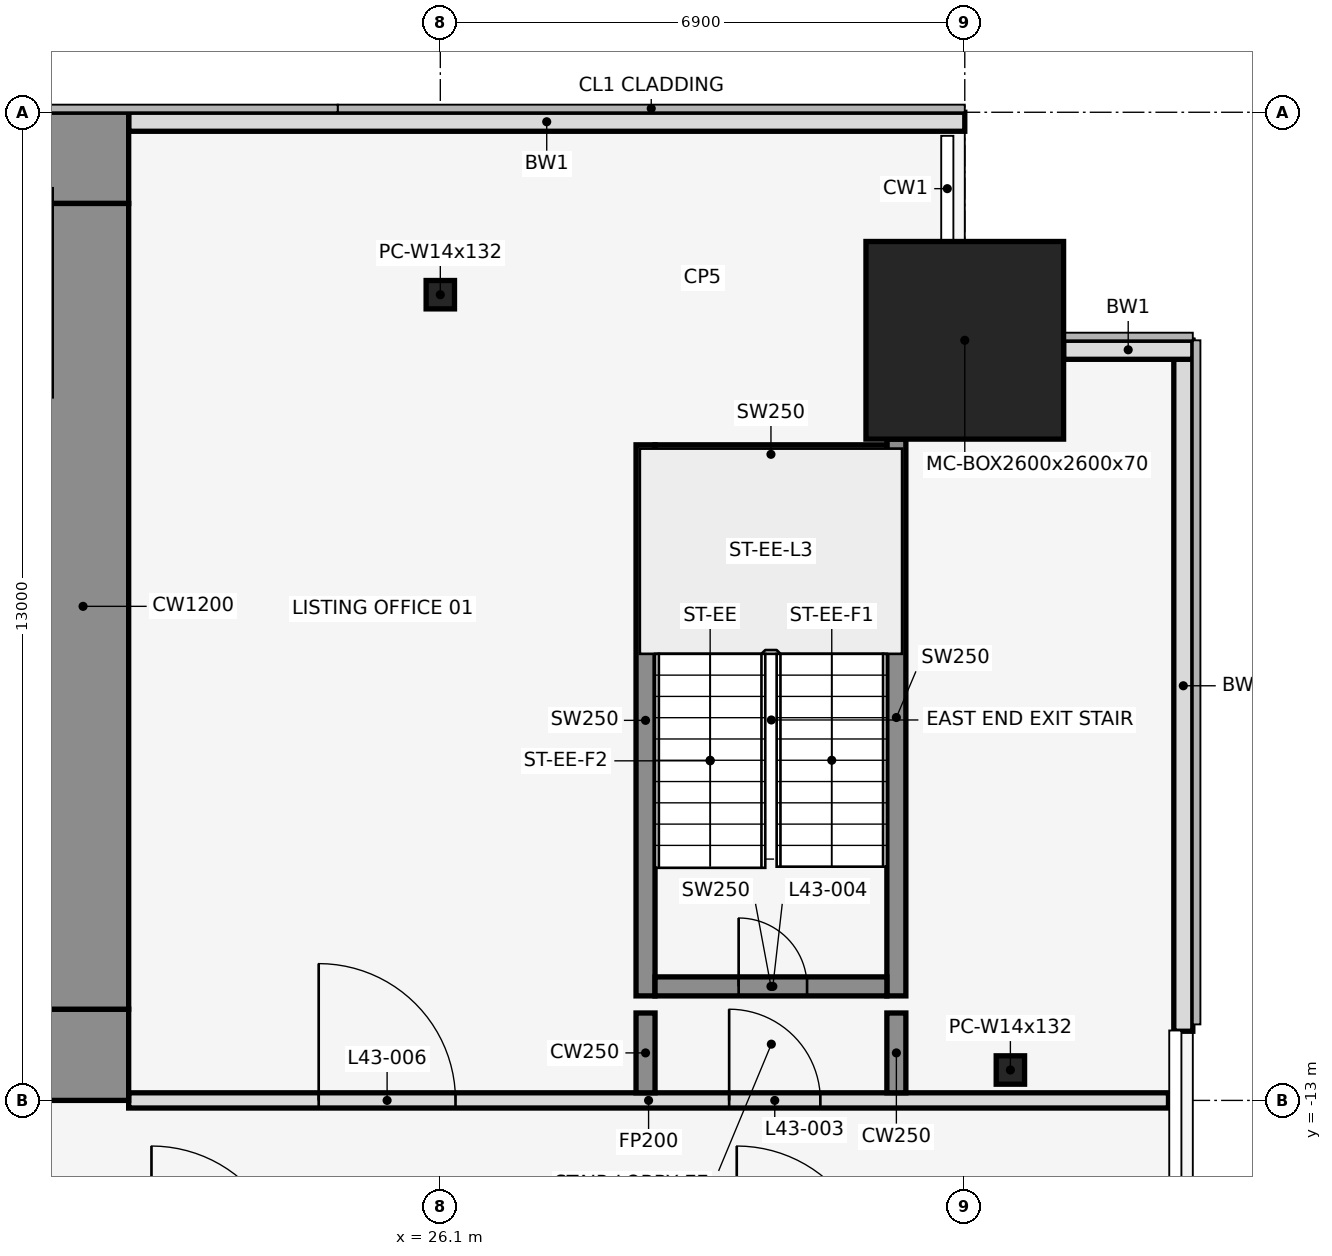
"""IFC4 building model, lengths in metres.
Left out: names, types, materials, properties, quantities, classifications, styles, units other than length and angle.
Written with IfcOpenShell. Run it as: python <this file> out.ifc"""

import sys

from ifc_helpers import new_model, si_unit, direction, frame, frame_2d, origin, origin_2d, place, context, subcontext, project, spatial, rectangle, hollow_rectangle, i_section, extrude, element, fill, save


model = new_model("IFC4")
c1 = context("Model", 3, precision=1e-05, world=origin(), true_north=direction((0.0, 1.0)))
c2 = subcontext(c1, "Body", "Model", "MODEL_VIEW")
j1 = project(units=[si_unit("LENGTHUNIT", "METRE"), si_unit("PLANEANGLEUNIT", "RADIAN")], contexts=[c1])
p1 = place(None, origin())
s1 = spatial("IfcSite", under=j1, at=p1, CompositionType="ELEMENT")
p2 = place(p1, origin())
s2 = spatial("IfcBuilding", under=s1, at=p2, CompositionType="ELEMENT")
p3 = place(p2, frame((0.0, 0.0, 195.0)))
s3 = spatial("IfcBuildingStorey", under=s2, at=p3, CompositionType="ELEMENT", Elevation=195.0)
p4 = place(p3, frame((26.1, -2.4, 0.0), z_axis=(0.0, 0.0, 1.0), x_axis=(1.0, 0.0, 0.0)))
e1 = element("IfcColumn", 1, at=p4, inside=s3, PredefinedType="COLUMN", context=c2, shape_type="SweptSolid", body=[
    extrude(i_section(OverallWidth=0.373, OverallDepth=0.373, WebThickness=0.016, FlangeThickness=0.026, at=origin_2d()), origin(), (0.0, 0.0, 1.0), 4.1),
])
p5 = place(p3, frame((33.0, -3.0, 0.0), z_axis=(0.0, 0.0, 1.0), x_axis=(1.0, 0.0, 0.0)))
e2 = element("IfcColumn", 2, at=p5, inside=s3, PredefinedType="COLUMN", context=c2, shape_type="SweptSolid", body=[
    extrude(hollow_rectangle(XDim=2.6, YDim=2.6, WallThickness=0.07, at=origin_2d()), origin(), (0.0, 0.0, 1.0), 4.1),
])
p6 = place(p3, frame((33.6, -12.6, 0.0), z_axis=(0.0, 0.0, 1.0), x_axis=(1.0, 0.0, 0.0)))
e3 = element("IfcColumn", 3, at=p6, inside=s3, PredefinedType="COLUMN", context=c2, shape_type="SweptSolid", body=[
    extrude(i_section(OverallWidth=0.373, OverallDepth=0.373, WebThickness=0.016, FlangeThickness=0.026, at=origin_2d()), origin(), (0.0, 0.0, 1.0), 4.1),
])
p7 = place(p3, frame((33.0, -0.125, 0.0), z_axis=(0.0, 0.0, 1.0), x_axis=(-1.0, 0.0, 0.0)))
e4 = element("IfcWall", 4, at=p7, inside=s3, PredefinedType="STANDARD", context=c2, shape_type="SweptSolid", body=[
    extrude(rectangle(XDim=11.0, YDim=0.25, at=frame_2d((5.5, 0.0))), origin(), (0.0, 0.0, 1.0), 3.95),
])
p8 = place(p3, frame((35.875, -12.09, 0.0), z_axis=(0.0, 0.0, 1.0), x_axis=(0.0, 1.0, 0.0)))
e5 = element("IfcWall", 5, at=p8, inside=s3, PredefinedType="STANDARD", context=c2, shape_type="SweptSolid", body=[
    extrude(rectangle(XDim=9.09, YDim=0.25, at=frame_2d((4.545, 0.0))), origin(), (0.0, 0.0, 1.0), 3.95),
])
p9 = place(p3, frame((36.0, -3.125, 0.0), z_axis=(0.0, 0.0, 1.0), x_axis=(-1.0, 0.0, 0.0)))
e6 = element("IfcWall", 6, at=p9, inside=s3, PredefinedType="STANDARD", context=c2, shape_type="SweptSolid", body=[
    extrude(rectangle(XDim=1.7, YDim=0.25, at=frame_2d((0.85, 0.0))), origin(), (0.0, 0.0, 1.0), 3.95),
])
p10 = place(p3, frame((28.8, -11.625, 0.0), z_axis=(0.0, 0.0, 1.0), x_axis=(0.0, 1.0, 0.0)))
e7 = element("IfcWall", 7, at=p10, inside=s3, PredefinedType="SHEAR", context=c2, shape_type="SweptSolid", body=[
    extrude(rectangle(XDim=7.25, YDim=0.25, at=frame_2d((3.625, 0.0))), origin(), (0.0, 0.0, 1.0), 4.1),
])
p11 = place(p3, frame((32.1, -11.625, 0.0), z_axis=(0.0, 0.0, 1.0), x_axis=(0.0, 1.0, 0.0)))
e8 = element("IfcWall", 8, at=p11, inside=s3, PredefinedType="SHEAR", context=c2, shape_type="SweptSolid", body=[
    extrude(rectangle(XDim=7.325, YDim=0.25, at=frame_2d((3.663, 0.0))), origin(), (0.0, 0.0, 1.0), 4.1),
])
p12 = place(p3, frame((28.925, -11.5, 0.0), z_axis=(0.0, 0.0, 1.0), x_axis=(1.0, 0.0, 0.0)))
e9 = element("IfcWall", 9, at=p12, inside=s3, PredefinedType="SHEAR", context=c2, shape_type="SweptSolid", body=[
    extrude(rectangle(XDim=3.05, YDim=0.25, at=frame_2d((1.525, 0.0))), origin(), (0.0, 0.0, 1.0), 4.1),
])
p13 = place(p12, frame((1.1, 0.0, 0.0)))
e10 = element("IfcOpeningElement", 10, at=p13, cuts=e9, PredefinedType="OPENING", context=c2, shape_type="SweptSolid", body=[
    extrude(rectangle(XDim=0.9, YDim=2.1, at=frame_2d((0.45, 1.05))), frame((0.0, 0.137, 0.0), z_axis=(0.0, -1.0, 0.0), x_axis=(1.0, 0.0, 0.0)), (0.0, 0.0, 1.0), 0.274),
])
p14 = place(p3, frame((28.925, -4.5, 0.0), z_axis=(0.0, 0.0, 1.0), x_axis=(1.0, 0.0, 0.0)))
e11 = element("IfcWall", 11, at=p14, inside=s3, PredefinedType="SHEAR", context=c2, shape_type="SweptSolid", body=[
    extrude(rectangle(XDim=3.05, YDim=0.25, at=frame_2d((1.525, 0.0))), origin(), (0.0, 0.0, 1.0), 4.1),
])
p15 = place(p3, frame((22.0, -13.0, 0.0), z_axis=(0.0, 0.0, 1.0), x_axis=(1.0, 0.0, 0.0)))
e12 = element("IfcWall", 12, at=p15, inside=s3, PredefinedType="PARTITIONING", context=c2, shape_type="SweptSolid", body=[
    extrude(rectangle(XDim=13.68, YDim=0.2, at=frame_2d((6.84, 0.0))), origin(), (0.0, 0.0, 1.0), 2.84),
])
p16 = place(p15, frame((7.9, 0.0, 0.0)))
e13 = element("IfcOpeningElement", 13, at=p16, cuts=e12, PredefinedType="OPENING", context=c2, shape_type="SweptSolid", body=[
    extrude(rectangle(XDim=1.2, YDim=2.1, at=frame_2d((0.6, 1.05))), frame((0.0, 0.112, 0.0), z_axis=(0.0, -1.0, 0.0), x_axis=(1.0, 0.0, 0.0)), (0.0, 0.0, 1.0), 0.224),
])
p17 = place(p15, frame((2.5, 0.0, 0.0)))
e14 = element("IfcOpeningElement", 14, at=p17, cuts=e12, PredefinedType="OPENING", context=c2, shape_type="SweptSolid", body=[
    extrude(rectangle(XDim=1.8, YDim=2.1, at=frame_2d((0.9, 1.05))), frame((0.0, 0.112, 0.0), z_axis=(0.0, -1.0, 0.0), x_axis=(1.0, 0.0, 0.0)), (0.0, 0.0, 1.0), 0.224),
])
for number, where, z_axis, x_axis in (
    (15, (28.8, -12.9, 0.0), (0.0, 0.0, 1.0), (0.0, 1.0, 0.0)),
    (16, (32.1, -12.9, 0.0), (0.0, 0.0, 1.0), (0.0, 1.0, 0.0)),
):
    element("IfcWall", number, at=place(p3, frame(where, z_axis=z_axis, x_axis=x_axis)), inside=s3, PredefinedType="SHEAR", context=c2, shape_type="SweptSolid", body=[
        extrude(rectangle(XDim=1.05, YDim=0.25, at=frame_2d((0.525, 0.0))), origin(), (0.0, 0.0, 1.0), 4.1),
    ])
p18 = place(p3, frame((-22.0, -0.6, 0.0), z_axis=(0.0, 0.0, 1.0), x_axis=(1.0, 0.0, 0.0)))
e17 = element("IfcWall", 17, at=p18, inside=s3, PredefinedType="SHEAR", context=c2, shape_type="SweptSolid", body=[
    extrude(rectangle(XDim=44.0, YDim=1.2, at=frame_2d((22.0, 0.0))), origin(), (0.0, 0.0, 1.0), 4.1),
])
p19 = place(p18, frame((18.55, 0.0, 0.0)))
e18 = element("IfcOpeningElement", 18, at=p19, cuts=e17, PredefinedType="OPENING", context=c2, shape_type="SweptSolid", body=[
    extrude(rectangle(XDim=0.9, YDim=2.1, at=frame_2d((0.45, 1.05))), frame((0.0, 0.612, 0.0), z_axis=(0.0, -1.0, 0.0), x_axis=(1.0, 0.0, 0.0)), (0.0, 0.0, 1.0), 1.224),
])
p20 = place(p18, frame((24.55, 0.0, 0.0)))
e19 = element("IfcOpeningElement", 19, at=p20, cuts=e17, PredefinedType="OPENING", context=c2, shape_type="SweptSolid", body=[
    extrude(rectangle(XDim=0.9, YDim=2.1, at=frame_2d((0.45, 1.05))), frame((0.0, 0.612, 0.0), z_axis=(0.0, -1.0, 0.0), x_axis=(1.0, 0.0, 0.0)), (0.0, 0.0, 1.0), 1.224),
])
p21 = place(p3, frame((-22.0, -12.4, 0.0), z_axis=(0.0, 0.0, 1.0), x_axis=(1.0, 0.0, 0.0)))
e20 = element("IfcWall", 20, at=p21, inside=s3, PredefinedType="SHEAR", context=c2, shape_type="SweptSolid", body=[
    extrude(rectangle(XDim=44.0, YDim=1.2, at=frame_2d((22.0, 0.0))), origin(), (0.0, 0.0, 1.0), 4.1),
])
p22 = place(p21, frame((2.2, 0.0, 0.0)))
e21 = element("IfcOpeningElement", 21, at=p22, cuts=e20, PredefinedType="OPENING", context=c2, shape_type="SweptSolid", body=[
    extrude(rectangle(XDim=1.2, YDim=2.1, at=frame_2d((0.6, 1.05))), frame((0.0, 0.612, 0.0), z_axis=(0.0, -1.0, 0.0), x_axis=(1.0, 0.0, 0.0)), (0.0, 0.0, 1.0), 1.224),
])
p23 = place(p21, frame((21.4, 0.0, 0.0)))
e22 = element("IfcOpeningElement", 22, at=p23, cuts=e20, PredefinedType="OPENING", context=c2, shape_type="SweptSolid", body=[
    extrude(rectangle(XDim=1.2, YDim=2.1, at=frame_2d((0.6, 1.05))), frame((0.0, 0.612, 0.0), z_axis=(0.0, -1.0, 0.0), x_axis=(1.0, 0.0, 0.0)), (0.0, 0.0, 1.0), 1.224),
])
p24 = place(p21, frame((40.6, 0.0, 0.0)))
e23 = element("IfcOpeningElement", 23, at=p24, cuts=e20, PredefinedType="OPENING", context=c2, shape_type="SweptSolid", body=[
    extrude(rectangle(XDim=1.2, YDim=2.1, at=frame_2d((0.6, 1.05))), frame((0.0, 0.612, 0.0), z_axis=(0.0, -1.0, 0.0), x_axis=(1.0, 0.0, 0.0)), (0.0, 0.0, 1.0), 1.224),
])
p25 = place(p21, frame((16.0, 0.0, 0.0)))
e24 = element("IfcOpeningElement", 24, at=p25, cuts=e20, PredefinedType="OPENING", context=c2, shape_type="SweptSolid", body=[
    extrude(rectangle(XDim=1.8, YDim=2.1, at=frame_2d((0.9, 1.05))), frame((0.0, 0.612, 0.0), z_axis=(0.0, -1.0, 0.0), x_axis=(1.0, 0.0, 0.0)), (0.0, 0.0, 1.0), 1.224),
])
p26 = place(p21, frame((6.3, 0.0, 0.0)))
e25 = element("IfcOpeningElement", 25, at=p26, cuts=e20, PredefinedType="OPENING", context=c2, shape_type="SweptSolid", body=[
    extrude(rectangle(XDim=1.2, YDim=2.1, at=frame_2d((0.6, 1.05))), frame((0.0, 0.612, 0.0), z_axis=(0.0, -1.0, 0.0), x_axis=(1.0, 0.0, 0.0)), (0.0, 0.0, 1.0), 1.224),
])
p27 = place(p21, frame((26.2, 0.0, 0.0)))
e26 = element("IfcOpeningElement", 26, at=p27, cuts=e20, PredefinedType="OPENING", context=c2, shape_type="SweptSolid", body=[
    extrude(rectangle(XDim=1.8, YDim=2.1, at=frame_2d((0.9, 1.05))), frame((0.0, 0.612, 0.0), z_axis=(0.0, -1.0, 0.0), x_axis=(1.0, 0.0, 0.0)), (0.0, 0.0, 1.0), 1.224),
])
p28 = place(p21, frame((36.5, 0.0, 0.0)))
e27 = element("IfcOpeningElement", 27, at=p28, cuts=e20, PredefinedType="OPENING", context=c2, shape_type="SweptSolid", body=[
    extrude(rectangle(XDim=1.2, YDim=2.1, at=frame_2d((0.6, 1.05))), frame((0.0, 0.612, 0.0), z_axis=(0.0, -1.0, 0.0), x_axis=(1.0, 0.0, 0.0)), (0.0, 0.0, 1.0), 1.224),
])
p29 = place(p3, frame((21.4, -11.8, 0.0), z_axis=(0.0, 0.0, 1.0), x_axis=(0.0, 1.0, 0.0)))
e28 = element("IfcWall", 28, at=p29, inside=s3, PredefinedType="SHEAR", context=c2, shape_type="SweptSolid", body=[
    extrude(rectangle(XDim=10.6, YDim=1.2, at=frame_2d((5.3, 0.0))), origin(), (0.0, 0.0, 1.0), 4.1),
])
p30 = place(p16, origin())
e29 = element("IfcDoor", 29, at=p30, inside=s3, OperationType="SINGLE_SWING_RIGHT", PredefinedType="DOOR", context=c2, shape_type="SweptSolid", body=[
    extrude(rectangle(XDim=1.2, YDim=2.1, at=frame_2d((0.6, 1.05))), frame((0.0, 0.025, 0.0), z_axis=(0.0, -1.0, 0.0), x_axis=(1.0, 0.0, 0.0)), (0.0, 0.0, 1.0), 0.05),
])
fill(e13, e29)
p31 = place(p13, origin())
e30 = element("IfcDoor", 30, at=p31, inside=s3, OperationType="SINGLE_SWING_LEFT", PredefinedType="DOOR", context=c2, shape_type="SweptSolid", body=[
    extrude(rectangle(XDim=0.9, YDim=2.1, at=frame_2d((0.45, 1.05))), frame((0.0, 0.025, 0.0), z_axis=(0.0, -1.0, 0.0), x_axis=(1.0, 0.0, 0.0)), (0.0, 0.0, 1.0), 0.05),
])
fill(e10, e30)
p32 = place(p17, origin())
e31 = element("IfcDoor", 31, at=p32, inside=s3, OperationType="SINGLE_SWING_LEFT", PredefinedType="DOOR", context=c2, shape_type="SweptSolid", body=[
    extrude(rectangle(XDim=1.8, YDim=2.1, at=frame_2d((0.9, 1.05))), frame((0.0, 0.025, 0.0), z_axis=(0.0, -1.0, 0.0), x_axis=(1.0, 0.0, 0.0)), (0.0, 0.0, 1.0), 0.05),
])
fill(e14, e31)
save(model, sys.argv[1])
